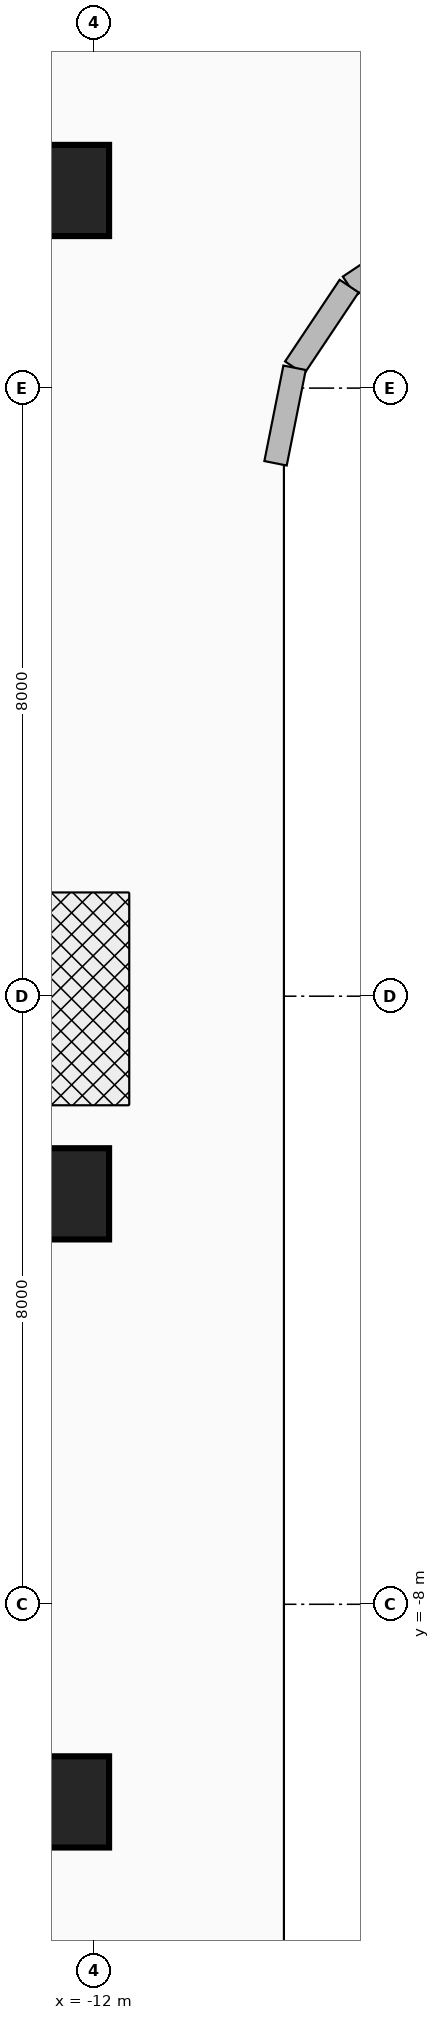
"""IFC4 building model, lengths in metres.
Left out: names, types, materials, properties, quantities, classifications, styles, units other than length and angle.
Written with IfcOpenShell. Run it as: python <this file> out.ifc"""

import sys

from ifc_helpers import new_model, si_unit, direction, frame, frame_2d, origin, origin_2d, place, context, subcontext, project, spatial, rectangle, extrude, source, transform, mapped, element, save


model = new_model("IFC4")
c1 = context("Model", 3, precision=1e-05, world=origin(), true_north=direction((0.0, 1.0)))
c2 = subcontext(c1, "Body", "Model", "MODEL_VIEW")
j1 = project(units=[si_unit("LENGTHUNIT", "METRE"), si_unit("PLANEANGLEUNIT", "RADIAN")], contexts=[c1])
p1 = place(None, origin())
s1 = spatial("IfcSite", under=j1, at=p1, CompositionType="ELEMENT")
p2 = place(p1, origin())
s2 = spatial("IfcBuilding", under=s1, at=p2, CompositionType="ELEMENT")
p3 = place(p2, frame((0.0, 0.0, 101.1)))
s3 = spatial("IfcBuildingStorey", under=s2, at=p3, CompositionType="ELEMENT", Elevation=101.1)
for number, where, z_axis, x_axis in (
    (1, (-22.65, 10.8, 0.0), (0.0, 0.0, 1.0), (1.0, 0.0, 0.0)),
    (2, (-22.65, -10.8, 0.0), (0.0, 0.0, 1.0), (1.0, 0.0, 0.0)),
):
    element("IfcWall", number, at=place(p3, frame(where, z_axis=z_axis, x_axis=x_axis)), inside=s3, PredefinedType="SHEAR", context=c2, shape_type="SweptSolid", body=[
        extrude(rectangle(XDim=10.25, YDim=0.7, at=frame_2d((5.125, 0.0))), origin(), (0.0, 0.0, 1.0), 4.36),
    ])
m1 = source(origin(), c2, "Body", "SweptSolid", [
    extrude(rectangle(XDim=1.2, YDim=1.2, at=origin_2d()), origin(), (0.0, 0.0, 1.0), 4.6),
])
for number, where, z_axis, x_axis in (
    (3, (-12.4, -10.6, 0.0), (0.0, 0.0, 1.0), (1.0, 0.0, 0.0)),
    (4, (-12.4, -2.6, 0.0), (0.0, 0.0, 1.0), (1.0, 0.0, 0.0)),
    (5, (-12.4, 10.6, 0.0), (0.0, 0.0, 1.0), (1.0, 0.0, 0.0)),
):
    element("IfcColumn", number, at=place(p3, frame(where, z_axis=z_axis, x_axis=x_axis)), inside=s3, PredefinedType="COLUMN", context=c2, shape_type="MappedRepresentation", body=[
        mapped(m1, transform((0.0, 0.0, 0.0), x_axis=(1.0, 0.0, 0.0), y_axis=(0.0, 1.0, 0.0), z_axis=(0.0, 0.0, 1.0), scale=1.0)),
    ])
p4 = place(p3, frame((-7.567, 10.06, 0.0), z_axis=(0.0, 0.0, 1.0), x_axis=(-0.831497739511, -0.555528135371, 0.0)))
e6 = element("IfcWall", 6, at=p4, inside=s3, PredefinedType="SOLIDWALL", context=c2, shape_type="SweptSolid", body=[
    extrude(rectangle(XDim=1.292, YDim=0.3, at=frame_2d((0.646, 0.0))), origin(), (0.0, 0.0, 1.0), 4.36),
])
p5 = place(p3, frame((-8.642, 9.342, 0.0), z_axis=(0.0, 0.0, 1.0), x_axis=(-0.555615398575, -0.831439431869, 0.0)))
e7 = element("IfcWall", 7, at=p5, inside=s3, PredefinedType="SOLIDWALL", context=c2, shape_type="SweptSolid", body=[
    extrude(rectangle(XDim=1.292, YDim=0.3, at=frame_2d((0.646, 0.0))), origin(), (0.0, 0.0, 1.0), 4.36),
])
p6 = place(p3, frame((-9.36, 8.268, 0.0), z_axis=(0.0, 0.0, 1.0), x_axis=(-0.195090163074, -0.980785312019, 0.0)))
e8 = element("IfcWall", 8, at=p6, inside=s3, PredefinedType="SOLIDWALL", context=c2, shape_type="SweptSolid", body=[
    extrude(rectangle(XDim=1.281, YDim=0.3, at=frame_2d((0.641, 0.0))), origin(), (0.0, 0.0, 1.0), 4.36),
])
save(model, sys.argv[1])
